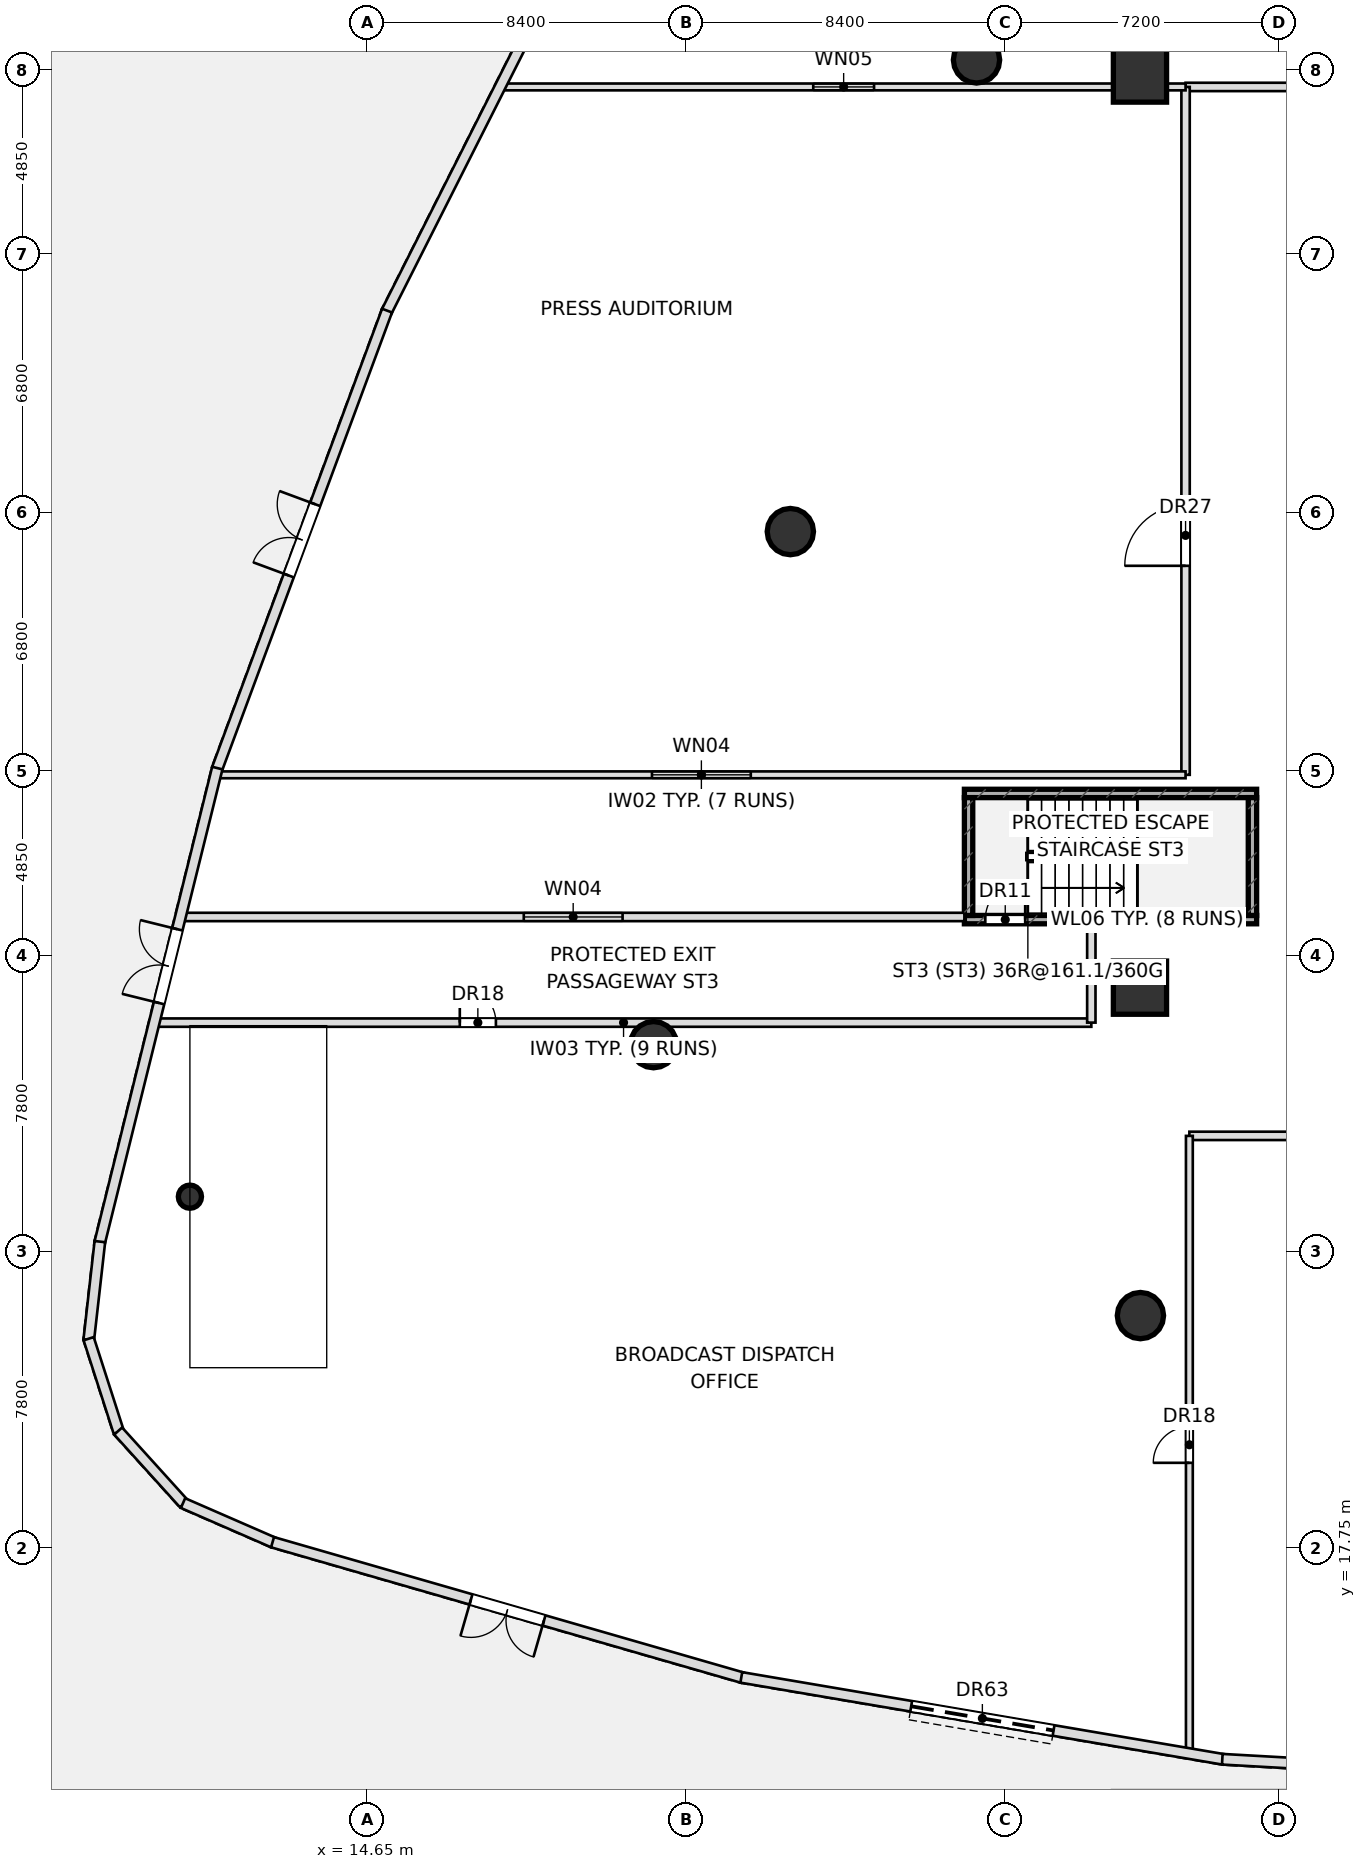
"""IFC4 building model, lengths in metres.
Left out: names, types, materials, properties, quantities, classifications, styles, units other than length and angle.
Written with IfcOpenShell. Run it as: python <this file> out.ifc"""

import sys

from ifc_helpers import new_model, si_unit, direction, frame, frame_2d, origin, origin_2d, place, context, subcontext, project, spatial, rectangle, hollow_circle, extrude, element, fill, save


model = new_model("IFC4")
c1 = context("Model", 3, precision=1e-05, world=origin(), true_north=direction((0.0, 1.0)))
c2 = subcontext(c1, "Body", "Model", "MODEL_VIEW")
j1 = project(units=[si_unit("LENGTHUNIT", "METRE"), si_unit("PLANEANGLEUNIT", "RADIAN")], contexts=[c1])
p1 = place(None, origin())
s1 = spatial("IfcSite", under=j1, at=p1, CompositionType="ELEMENT")
p2 = place(p1, origin())
s2 = spatial("IfcBuilding", under=s1, at=p2, CompositionType="ELEMENT")
p3 = place(p2, origin())
s3 = spatial("IfcBuildingStorey", under=s2, at=p3, CompositionType="ELEMENT", Elevation=0.0)
p4 = place(p3, frame((30.38, 34.29, 0.0), z_axis=(0.0, 0.0, 1.0), x_axis=(1.0, 0.0, 0.0)))
e1 = element("IfcWall", 1, at=p4, inside=s3, PredefinedType="SHEAR", context=c2, shape_type="SweptSolid", body=[
    extrude(rectangle(XDim=7.69, YDim=0.22, at=frame_2d((3.845, 0.0))), origin(), (0.0, 0.0, 1.0), 5.45),
])
p5 = place(p4, frame((0.55, 0.0, 0.0)))
e2 = element("IfcOpeningElement", 2, at=p5, cuts=e1, PredefinedType="OPENING", context=c2, shape_type="SweptSolid", body=[
    extrude(rectangle(XDim=1.05, YDim=2.2, at=frame_2d((0.525, 1.1))), frame((0.0, 0.12, 0.0), z_axis=(0.0, -1.0, 0.0), x_axis=(1.0, 0.0, 0.0)), (0.0, 0.0, 1.0), 0.24),
])
p6 = place(p3, frame((30.38, 37.61, 0.0), z_axis=(0.0, 0.0, 1.0), x_axis=(1.0, 0.0, 0.0)))
e3 = element("IfcWall", 3, at=p6, inside=s3, PredefinedType="SHEAR", context=c2, shape_type="SweptSolid", body=[
    extrude(rectangle(XDim=7.69, YDim=0.22, at=frame_2d((3.845, 0.0))), origin(), (0.0, 0.0, 1.0), 5.45),
])
for number, where, z_axis, x_axis in (
    (4, (37.96, 34.4, 0.0), (0.0, 0.0, 1.0), (0.0, 1.0, 0.0)),
    (5, (30.49, 34.4, 0.0), (0.0, 0.0, 1.0), (0.0, 1.0, 0.0)),
):
    element("IfcWall", number, at=place(p3, frame(where, z_axis=z_axis, x_axis=x_axis)), inside=s3, PredefinedType="SHEAR", context=c2, shape_type="SweptSolid", body=[
        extrude(rectangle(XDim=3.1, YDim=0.22, at=frame_2d((1.55, 0.0))), origin(), (0.0, 0.0, 1.0), 5.45),
    ])
for number, where, z_axis, x_axis in (
    (6, (35.0, 32.5, 0.0), (0.0, 0.0, 1.0), (1.0, 0.0, 0.0)),
    (7, (35.0, 56.5, 0.0), (0.0, 0.0, 1.0), (1.0, 0.0, 0.0)),
):
    element("IfcColumn", number, at=place(p3, frame(where, z_axis=z_axis, x_axis=x_axis)), inside=s3, PredefinedType="COLUMN", context=c2, shape_type="SweptSolid", body=[
        extrude(rectangle(XDim=1.4, YDim=1.4, at=origin_2d()), origin(), (0.0, 0.0, 1.0), 5.45),
    ])
for number, where, z_axis, x_axis in (
    (8, (30.699, 56.911, 0.0), (0.0, 0.0, 1.0), (1.0, 0.0, 0.0)),
    (9, (25.8, 44.5, 0.0), (0.0, 0.0, 1.0), (1.0, 0.0, 0.0)),
    (10, (22.2, 31.0, 0.0), (0.0, 0.0, 1.0), (1.0, 0.0, 0.0)),
    (11, (35.012, 23.871, 0.0), (0.0, 0.0, 1.0), (1.0, 0.0, 0.0)),
):
    element("IfcColumn", number, at=place(p3, frame(where, z_axis=z_axis, x_axis=x_axis)), inside=s3, PredefinedType="COLUMN", context=c2, shape_type="SweptSolid", body=[
        extrude(hollow_circle(Radius=0.61, WallThickness=0.05, at=origin_2d()), origin(), (0.0, 0.0, 1.0), 5.45),
    ])
p7 = place(p3, frame((10.0, 27.0, 0.0), z_axis=(0.0, 0.0, 1.0), x_axis=(1.0, 0.0, 0.0)))
e12 = element("IfcColumn", 12, at=p7, inside=s3, PredefinedType="COLUMN", context=c2, shape_type="SweptSolid", body=[
    extrude(hollow_circle(Radius=0.305, WallThickness=0.028, at=origin_2d()), origin(), (0.0, 0.0, 1.0), 5.45),
])
p8 = place(p3, frame((9.102, 31.58, 0.0), z_axis=(0.0, 0.0, 1.0), x_axis=(1.0, 0.0, 0.0)))
e13 = element("IfcWall", 13, at=p8, inside=s3, PredefinedType="PARTITIONING", context=c2, shape_type="SweptSolid", body=[
    extrude(rectangle(XDim=24.618, YDim=0.22, at=frame_2d((12.309, 0.0))), origin(), (0.0, 0.0, 1.0), 4.525),
])
p9 = place(p8, frame((8.0, 0.0, 0.0)))
e14 = element("IfcOpeningElement", 14, at=p9, cuts=e13, PredefinedType="OPENING", context=c2, shape_type="SweptSolid", body=[
    extrude(rectangle(XDim=0.95, YDim=2.05, at=frame_2d((0.475, 1.025))), frame((0.0, 0.12, 0.0), z_axis=(0.0, -1.0, 0.0), x_axis=(1.0, 0.0, 0.0)), (0.0, 0.0, 1.0), 0.24),
])
p10 = place(p3, frame((9.791, 34.36, 0.0), z_axis=(0.0, 0.0, 1.0), x_axis=(1.0, 0.0, 0.0)))
e15 = element("IfcWall", 15, at=p10, inside=s3, PredefinedType="PARTITIONING", context=c2, shape_type="SweptSolid", body=[
    extrude(rectangle(XDim=20.589, YDim=0.22, at=frame_2d((10.294, 0.0))), origin(), (0.0, 0.0, 1.0), 4.625),
])
p11 = place(p10, frame((8.994, 0.0, 1.05)))
e16 = element("IfcOpeningElement", 16, at=p11, cuts=e15, PredefinedType="OPENING", context=c2, shape_type="SweptSolid", body=[
    extrude(rectangle(XDim=2.6, YDim=1.5, at=frame_2d((1.3, 0.75))), frame((0.0, 0.12, 0.0), z_axis=(0.0, -1.0, 0.0), x_axis=(1.0, 0.0, 0.0)), (0.0, 0.0, 1.0), 0.24),
])
p12 = place(p3, frame((33.72, 31.58, 0.0), z_axis=(0.0, 0.0, 1.0), x_axis=(0.0, 1.0, 0.0)))
e17 = element("IfcWall", 17, at=p12, inside=s3, PredefinedType="PARTITIONING", context=c2, shape_type="SweptSolid", body=[
    extrude(rectangle(XDim=2.78, YDim=0.22, at=frame_2d((1.39, 0.0))), origin(), (0.0, 0.0, 1.0), 4.525),
])
p13 = place(p3, frame((36.3, 28.6, 0.0), z_axis=(0.0, 0.0, 1.0), x_axis=(1.0, 0.0, 0.0)))
e18 = element("IfcWall", 18, at=p13, inside=s3, PredefinedType="PARTITIONING", context=c2, shape_type="SweptSolid", body=[
    extrude(rectangle(XDim=21.04, YDim=0.22, at=frame_2d((10.52, 0.0))), origin(), (0.0, 0.0, 1.0), 4.525),
])
p14 = place(p13, frame((6.5, 0.0, 0.0)))
e19 = element("IfcOpeningElement", 19, at=p14, cuts=e18, PredefinedType="OPENING", context=c2, shape_type="SweptSolid", body=[
    extrude(rectangle(XDim=1.6, YDim=2.3, at=frame_2d((0.8, 1.15))), frame((0.0, 0.12, 0.0), z_axis=(0.0, -1.0, 0.0), x_axis=(1.0, 0.0, 0.0)), (0.0, 0.0, 1.0), 0.24),
])
p15 = place(p3, frame((36.3, 12.387, 0.0), z_axis=(0.0, 0.0, 1.0), x_axis=(0.0, 1.0, 0.0)))
e20 = element("IfcWall", 20, at=p15, inside=s3, PredefinedType="PARTITIONING", context=c2, shape_type="SweptSolid", body=[
    extrude(rectangle(XDim=16.213, YDim=0.18, at=frame_2d((8.106, 0.0))), origin(), (0.0, 0.0, 1.0), 4.625),
])
p16 = place(p15, frame((7.61, 0.0, 0.0)))
e21 = element("IfcOpeningElement", 21, at=p16, cuts=e20, PredefinedType="OPENING", context=c2, shape_type="SweptSolid", body=[
    extrude(rectangle(XDim=0.95, YDim=2.05, at=frame_2d((0.475, 1.025))), frame((0.0, 0.1, 0.0), z_axis=(0.0, -1.0, 0.0), x_axis=(1.0, 0.0, 0.0)), (0.0, 0.0, 1.0), 0.2),
])
p17 = place(p3, frame((36.2, 56.2, 0.0), z_axis=(0.0, 0.0, 1.0), x_axis=(1.0, 0.0, 0.0)))
e22 = element("IfcWall", 22, at=p17, inside=s3, PredefinedType="PARTITIONING", context=c2, shape_type="SweptSolid", body=[
    extrude(rectangle(XDim=22.6, YDim=0.22, at=frame_2d((11.3, 0.0))), origin(), (0.0, 0.0, 1.0), 5.45),
])
p18 = place(p17, frame((6.5, 0.0, 0.0)))
e23 = element("IfcOpeningElement", 23, at=p18, cuts=e22, PredefinedType="OPENING", context=c2, shape_type="SweptSolid", body=[
    extrude(rectangle(XDim=1.6, YDim=2.3, at=frame_2d((0.8, 1.15))), frame((0.0, 0.12, 0.0), z_axis=(0.0, -1.0, 0.0), x_axis=(1.0, 0.0, 0.0)), (0.0, 0.0, 1.0), 0.24),
])
p19 = place(p3, frame((36.2, 38.1, 0.0), z_axis=(0.0, 0.0, 1.0), x_axis=(0.0, 1.0, 0.0)))
e24 = element("IfcWall", 24, at=p19, inside=s3, PredefinedType="PARTITIONING", context=c2, shape_type="SweptSolid", body=[
    extrude(rectangle(XDim=18.1, YDim=0.22, at=frame_2d((9.05, 0.0))), origin(), (0.0, 0.0, 1.0), 4.525),
])
p20 = place(p19, frame((5.5, 0.0, 0.0)))
e25 = element("IfcOpeningElement", 25, at=p20, cuts=e24, PredefinedType="OPENING", context=c2, shape_type="SweptSolid", body=[
    extrude(rectangle(XDim=1.6, YDim=2.3, at=frame_2d((0.8, 1.15))), frame((0.0, 0.12, 0.0), z_axis=(0.0, -1.0, 0.0), x_axis=(1.0, 0.0, 0.0)), (0.0, 0.0, 1.0), 0.24),
])
p21 = place(p3, frame((10.718, 38.1, 0.0), z_axis=(0.0, 0.0, 1.0), x_axis=(1.0, 0.0, 0.0)))
e26 = element("IfcWall", 26, at=p21, inside=s3, PredefinedType="PARTITIONING", context=c2, shape_type="SweptSolid", body=[
    extrude(rectangle(XDim=25.482, YDim=0.18, at=frame_2d((12.741, 0.0))), origin(), (0.0, 0.0, 1.0), 4.625),
])
p22 = place(p21, frame((11.441, 0.0, 1.05)))
e27 = element("IfcOpeningElement", 27, at=p22, cuts=e26, PredefinedType="OPENING", context=c2, shape_type="SweptSolid", body=[
    extrude(rectangle(XDim=2.6, YDim=1.5, at=frame_2d((1.3, 0.75))), frame((0.0, 0.1, 0.0), z_axis=(0.0, -1.0, 0.0), x_axis=(1.0, 0.0, 0.0)), (0.0, 0.0, 1.0), 0.2),
])
p23 = place(p3, frame((18.205, 56.2, 0.0), z_axis=(0.0, 0.0, 1.0), x_axis=(1.0, 0.0, 0.0)))
e28 = element("IfcWall", 28, at=p23, inside=s3, PredefinedType="PARTITIONING", context=c2, shape_type="SweptSolid", body=[
    extrude(rectangle(XDim=17.995, YDim=0.18, at=frame_2d((8.997, 0.0))), origin(), (0.0, 0.0, 1.0), 4.625),
])
p24 = place(p23, frame((8.198, 0.0, 1.05)))
e29 = element("IfcOpeningElement", 29, at=p24, cuts=e28, PredefinedType="OPENING", context=c2, shape_type="SweptSolid", body=[
    extrude(rectangle(XDim=1.6, YDim=1.35, at=frame_2d((0.8, 0.675))), frame((0.0, 0.1, 0.0), z_axis=(0.0, -1.0, 0.0), x_axis=(1.0, 0.0, 0.0)), (0.0, 0.0, 1.0), 0.2),
])
p25 = place(p3, frame((20.975, 61.775, 0.0), z_axis=(0.0, 0.0, 1.0), x_axis=(-0.450617681831, -0.892717035136, 0.0)))
e30 = element("IfcWall", 30, at=p25, inside=s3, PredefinedType="STANDARD", context=c2, shape_type="SweptSolid", body=[
    extrude(rectangle(XDim=12.869, YDim=0.28, at=frame_2d((6.434, 0.0))), origin(), (0.0, 0.0, 1.0), 5.45),
])
p26 = place(p3, frame((15.188, 50.314, 0.0), z_axis=(0.0, 0.0, 1.0), x_axis=(-0.347769703633, -0.937579987646, 0.0)))
e31 = element("IfcWall", 31, at=p26, inside=s3, PredefinedType="STANDARD", context=c2, shape_type="SweptSolid", body=[
    extrude(rectangle(XDim=12.869, YDim=0.28, at=frame_2d((6.434, 0.0))), origin(), (0.0, 0.0, 1.0), 5.45),
])
p27 = place(p26, frame((5.434, 0.0, 0.0)))
e32 = element("IfcOpeningElement", 32, at=p27, cuts=e31, PredefinedType="OPENING", context=c2, shape_type="SweptSolid", body=[
    extrude(rectangle(XDim=2.0, YDim=2.6, at=frame_2d((1.0, 1.3))), frame((0.0, 0.15, 0.0), z_axis=(0.0, -1.0, 0.0), x_axis=(1.0, 0.0, 0.0)), (0.0, 0.0, 1.0), 0.3),
])
p28 = place(p3, frame((10.721, 38.278, 0.0), z_axis=(0.0, 0.0, 1.0), x_axis=(-0.240566335087, -0.970632700058, 0.0)))
e33 = element("IfcWall", 33, at=p28, inside=s3, PredefinedType="STANDARD", context=c2, shape_type="SweptSolid", body=[
    extrude(rectangle(XDim=12.867, YDim=0.28, at=frame_2d((6.434, 0.0))), origin(), (0.0, 0.0, 1.0), 5.45),
])
p29 = place(p28, frame((4.368, 0.0, 0.0)))
e34 = element("IfcOpeningElement", 34, at=p29, cuts=e33, PredefinedType="OPENING", context=c2, shape_type="SweptSolid", body=[
    extrude(rectangle(XDim=2.0, YDim=2.6, at=frame_2d((1.0, 1.3))), frame((0.0, 0.15, 0.0), z_axis=(0.0, -1.0, 0.0), x_axis=(1.0, 0.0, 0.0)), (0.0, 0.0, 1.0), 0.3),
])
p30 = place(p3, frame((7.631, 25.818, 0.0), z_axis=(0.0, 0.0, 1.0), x_axis=(-0.112368346336, -0.993666621529, 0.0)))
e35 = element("IfcWall", 35, at=p30, inside=s3, PredefinedType="STANDARD", context=c2, shape_type="SweptSolid", body=[
    extrude(rectangle(XDim=2.601, YDim=0.28, at=frame_2d((1.3, 0.0))), origin(), (0.0, 0.0, 1.0), 5.45),
])
p31 = place(p3, frame((7.336, 23.263, 0.0), z_axis=(0.0, 0.0, 1.0), x_axis=(0.306557527808, -0.9518521325, 0.0)))
e36 = element("IfcWall", 36, at=p31, inside=s3, PredefinedType="STANDARD", context=c2, shape_type="SweptSolid", body=[
    extrude(rectangle(XDim=2.58, YDim=0.28, at=frame_2d((1.29, 0.0))), origin(), (0.0, 0.0, 1.0), 5.45),
])
p32 = place(p3, frame((8.112, 20.833, 0.0), z_axis=(0.0, 0.0, 1.0), x_axis=(0.671069446412, -0.741394495591, 0.0)))
e37 = element("IfcWall", 37, at=p32, inside=s3, PredefinedType="STANDARD", context=c2, shape_type="SweptSolid", body=[
    extrude(rectangle(XDim=2.579, YDim=0.28, at=frame_2d((1.29, 0.0))), origin(), (0.0, 0.0, 1.0), 5.45),
])
p33 = place(p3, frame((9.819, 18.938, 0.0), z_axis=(0.0, 0.0, 1.0), x_axis=(0.91666510017, -0.399656219933, 0.0)))
e38 = element("IfcWall", 38, at=p33, inside=s3, PredefinedType="STANDARD", context=c2, shape_type="SweptSolid", body=[
    extrude(rectangle(XDim=2.601, YDim=0.28, at=frame_2d((1.3, 0.0))), origin(), (0.0, 0.0, 1.0), 5.45),
])
p34 = place(p3, frame((12.175, 17.908, 0.0), z_axis=(0.0, 0.0, 1.0), x_axis=(0.960876918243, -0.276975717325, 0.0)))
e39 = element("IfcWall", 39, at=p34, inside=s3, PredefinedType="STANDARD", context=c2, shape_type="SweptSolid", body=[
    extrude(rectangle(XDim=12.867, YDim=0.28, at=frame_2d((6.434, 0.0))), origin(), (0.0, 0.0, 1.0), 5.45),
])
p35 = place(p34, frame((5.434, 0.0, 0.0)))
e40 = element("IfcOpeningElement", 40, at=p35, cuts=e39, PredefinedType="OPENING", context=c2, shape_type="SweptSolid", body=[
    extrude(rectangle(XDim=2.0, YDim=2.6, at=frame_2d((1.0, 1.3))), frame((0.0, 0.15, 0.0), z_axis=(0.0, -1.0, 0.0), x_axis=(1.0, 0.0, 0.0)), (0.0, 0.0, 1.0), 0.3),
])
p36 = place(p3, frame((24.51, 14.351, 0.0), z_axis=(0.0, 0.0, 1.0), x_axis=(0.985856003398, -0.167594572001, 0.0)))
e41 = element("IfcWall", 41, at=p36, inside=s3, PredefinedType="STANDARD", context=c2, shape_type="SweptSolid", body=[
    extrude(rectangle(XDim=12.869, YDim=0.28, at=frame_2d((6.435, 0.0))), origin(), (0.0, 0.0, 1.0), 5.45),
])
p37 = place(p36, frame((4.534, 0.0, 0.0)))
e42 = element("IfcOpeningElement", 42, at=p37, cuts=e41, PredefinedType="OPENING", context=c2, shape_type="SweptSolid", body=[
    extrude(rectangle(XDim=3.8, YDim=3.6, at=frame_2d((1.9, 1.8))), frame((0.0, 0.15, 0.0), z_axis=(0.0, -1.0, 0.0), x_axis=(1.0, 0.0, 0.0)), (0.0, 0.0, 1.0), 0.3),
])
p38 = place(p3, frame((37.167, 12.198, 0.0), z_axis=(0.0, 0.0, 1.0), x_axis=(0.998425188475, -0.056099403012, 0.0)))
e43 = element("IfcWall", 43, at=p38, inside=s3, PredefinedType="STANDARD", context=c2, shape_type="SweptSolid", body=[
    extrude(rectangle(XDim=12.869, YDim=0.28, at=frame_2d((6.434, 0.0))), origin(), (0.0, 0.0, 1.0), 5.45),
])
p39 = place(p38, frame((5.434, 0.0, 0.0)))
e44 = element("IfcOpeningElement", 44, at=p39, cuts=e43, PredefinedType="OPENING", context=c2, shape_type="SweptSolid", body=[
    extrude(rectangle(XDim=2.0, YDim=2.6, at=frame_2d((1.0, 1.3))), frame((0.0, 0.15, 0.0), z_axis=(0.0, -1.0, 0.0), x_axis=(1.0, 0.0, 0.0)), (0.0, 0.0, 1.0), 0.3),
])
p40 = place(p5, origin())
e45 = element("IfcDoor", 45, at=p40, inside=s3, OperationType="SINGLE_SWING_RIGHT", PredefinedType="DOOR", context=c2, shape_type="SweptSolid", body=[
    extrude(rectangle(XDim=1.05, YDim=2.2, at=frame_2d((0.525, 1.1))), frame((0.0, 0.025, 0.0), z_axis=(0.0, -1.0, 0.0), x_axis=(1.0, 0.0, 0.0)), (0.0, 0.0, 1.0), 0.05),
])
fill(e2, e45)
p41 = place(p9, origin())
e46 = element("IfcDoor", 46, at=p41, inside=s3, OperationType="SINGLE_SWING_LEFT", PredefinedType="DOOR", context=c2, shape_type="SweptSolid", body=[
    extrude(rectangle(XDim=0.95, YDim=2.05, at=frame_2d((0.475, 1.025))), frame((0.0, 0.025, 0.0), z_axis=(0.0, -1.0, 0.0), x_axis=(1.0, 0.0, 0.0)), (0.0, 0.0, 1.0), 0.05),
])
fill(e14, e46)
p42 = place(p16, origin())
e47 = element("IfcDoor", 47, at=p42, inside=s3, OperationType="SINGLE_SWING_LEFT", PredefinedType="DOOR", context=c2, shape_type="SweptSolid", body=[
    extrude(rectangle(XDim=0.95, YDim=2.05, at=frame_2d((0.475, 1.025))), frame((0.0, 0.025, 0.0), z_axis=(0.0, -1.0, 0.0), x_axis=(1.0, 0.0, 0.0)), (0.0, 0.0, 1.0), 0.05),
])
fill(e21, e47)
p43 = place(p20, origin())
e48 = element("IfcDoor", 48, at=p43, inside=s3, OperationType="SINGLE_SWING_LEFT", PredefinedType="DOOR", context=c2, shape_type="SweptSolid", body=[
    extrude(rectangle(XDim=1.6, YDim=2.3, at=frame_2d((0.8, 1.15))), frame((0.0, 0.025, 0.0), z_axis=(0.0, -1.0, 0.0), x_axis=(1.0, 0.0, 0.0)), (0.0, 0.0, 1.0), 0.05),
])
fill(e25, e48)
p44 = place(p27, frame((2.0, 0.0, 0.0), z_axis=(0.0, 0.0, 1.0), x_axis=(-1.0, 0.0, 0.0)))
e49 = element("IfcDoor", 49, at=p44, inside=s3, OperationType="DOUBLE_DOOR_SINGLE_SWING", PredefinedType="DOOR", context=c2, shape_type="SweptSolid", body=[
    extrude(rectangle(XDim=2.0, YDim=2.6, at=frame_2d((1.0, 1.3))), frame((0.0, 0.025, 0.0), z_axis=(0.0, -1.0, 0.0), x_axis=(1.0, 0.0, 0.0)), (0.0, 0.0, 1.0), 0.05),
])
fill(e32, e49)
p45 = place(p29, frame((2.0, 0.0, 0.0), z_axis=(0.0, 0.0, 1.0), x_axis=(-1.0, 0.0, 0.0)))
e50 = element("IfcDoor", 50, at=p45, inside=s3, OperationType="DOUBLE_DOOR_SINGLE_SWING", PredefinedType="DOOR", context=c2, shape_type="SweptSolid", body=[
    extrude(rectangle(XDim=2.0, YDim=2.6, at=frame_2d((1.0, 1.3))), frame((0.0, 0.025, 0.0), z_axis=(0.0, -1.0, 0.0), x_axis=(1.0, 0.0, 0.0)), (0.0, 0.0, 1.0), 0.05),
])
fill(e34, e50)
p46 = place(p35, frame((2.0, 0.0, 0.0), z_axis=(0.0, 0.0, 1.0), x_axis=(-1.0, 0.0, 0.0)))
e51 = element("IfcDoor", 51, at=p46, inside=s3, OperationType="DOUBLE_DOOR_SINGLE_SWING", PredefinedType="DOOR", context=c2, shape_type="SweptSolid", body=[
    extrude(rectangle(XDim=2.0, YDim=2.6, at=frame_2d((1.0, 1.3))), frame((0.0, 0.025, 0.0), z_axis=(0.0, -1.0, 0.0), x_axis=(1.0, 0.0, 0.0)), (0.0, 0.0, 1.0), 0.05),
])
fill(e40, e51)
p47 = place(p37, origin())
e52 = element("IfcDoor", 52, at=p47, inside=s3, OperationType="ROLLINGUP", PredefinedType="GATE", context=c2, shape_type="SweptSolid", body=[
    extrude(rectangle(XDim=3.8, YDim=3.6, at=frame_2d((1.9, 1.8))), frame((0.0, 0.025, 0.0), z_axis=(0.0, -1.0, 0.0), x_axis=(1.0, 0.0, 0.0)), (0.0, 0.0, 1.0), 0.05),
])
fill(e42, e52)
p48 = place(p11, origin())
e53 = element("IfcWindow", 53, at=p48, inside=s3, PartitioningType="SINGLE_PANEL", PredefinedType="WINDOW", context=c2, shape_type="SweptSolid", body=[
    extrude(rectangle(XDim=2.6, YDim=1.5, at=frame_2d((1.3, 0.75))), frame((0.0, 0.03, 0.0), z_axis=(0.0, -1.0, 0.0), x_axis=(1.0, 0.0, 0.0)), (0.0, 0.0, 1.0), 0.06),
])
fill(e16, e53)
p49 = place(p22, origin())
e54 = element("IfcWindow", 54, at=p49, inside=s3, PartitioningType="SINGLE_PANEL", PredefinedType="WINDOW", context=c2, shape_type="SweptSolid", body=[
    extrude(rectangle(XDim=2.6, YDim=1.5, at=frame_2d((1.3, 0.75))), frame((0.0, 0.03, 0.0), z_axis=(0.0, -1.0, 0.0), x_axis=(1.0, 0.0, 0.0)), (0.0, 0.0, 1.0), 0.06),
])
fill(e27, e54)
p50 = place(p24, origin())
e55 = element("IfcWindow", 55, at=p50, inside=s3, PartitioningType="SINGLE_PANEL", PredefinedType="WINDOW", context=c2, shape_type="SweptSolid", body=[
    extrude(rectangle(XDim=1.6, YDim=1.35, at=frame_2d((0.8, 0.675))), frame((0.0, 0.03, 0.0), z_axis=(0.0, -1.0, 0.0), x_axis=(1.0, 0.0, 0.0)), (0.0, 0.0, 1.0), 0.06),
])
fill(e29, e55)
save(model, sys.argv[1])
